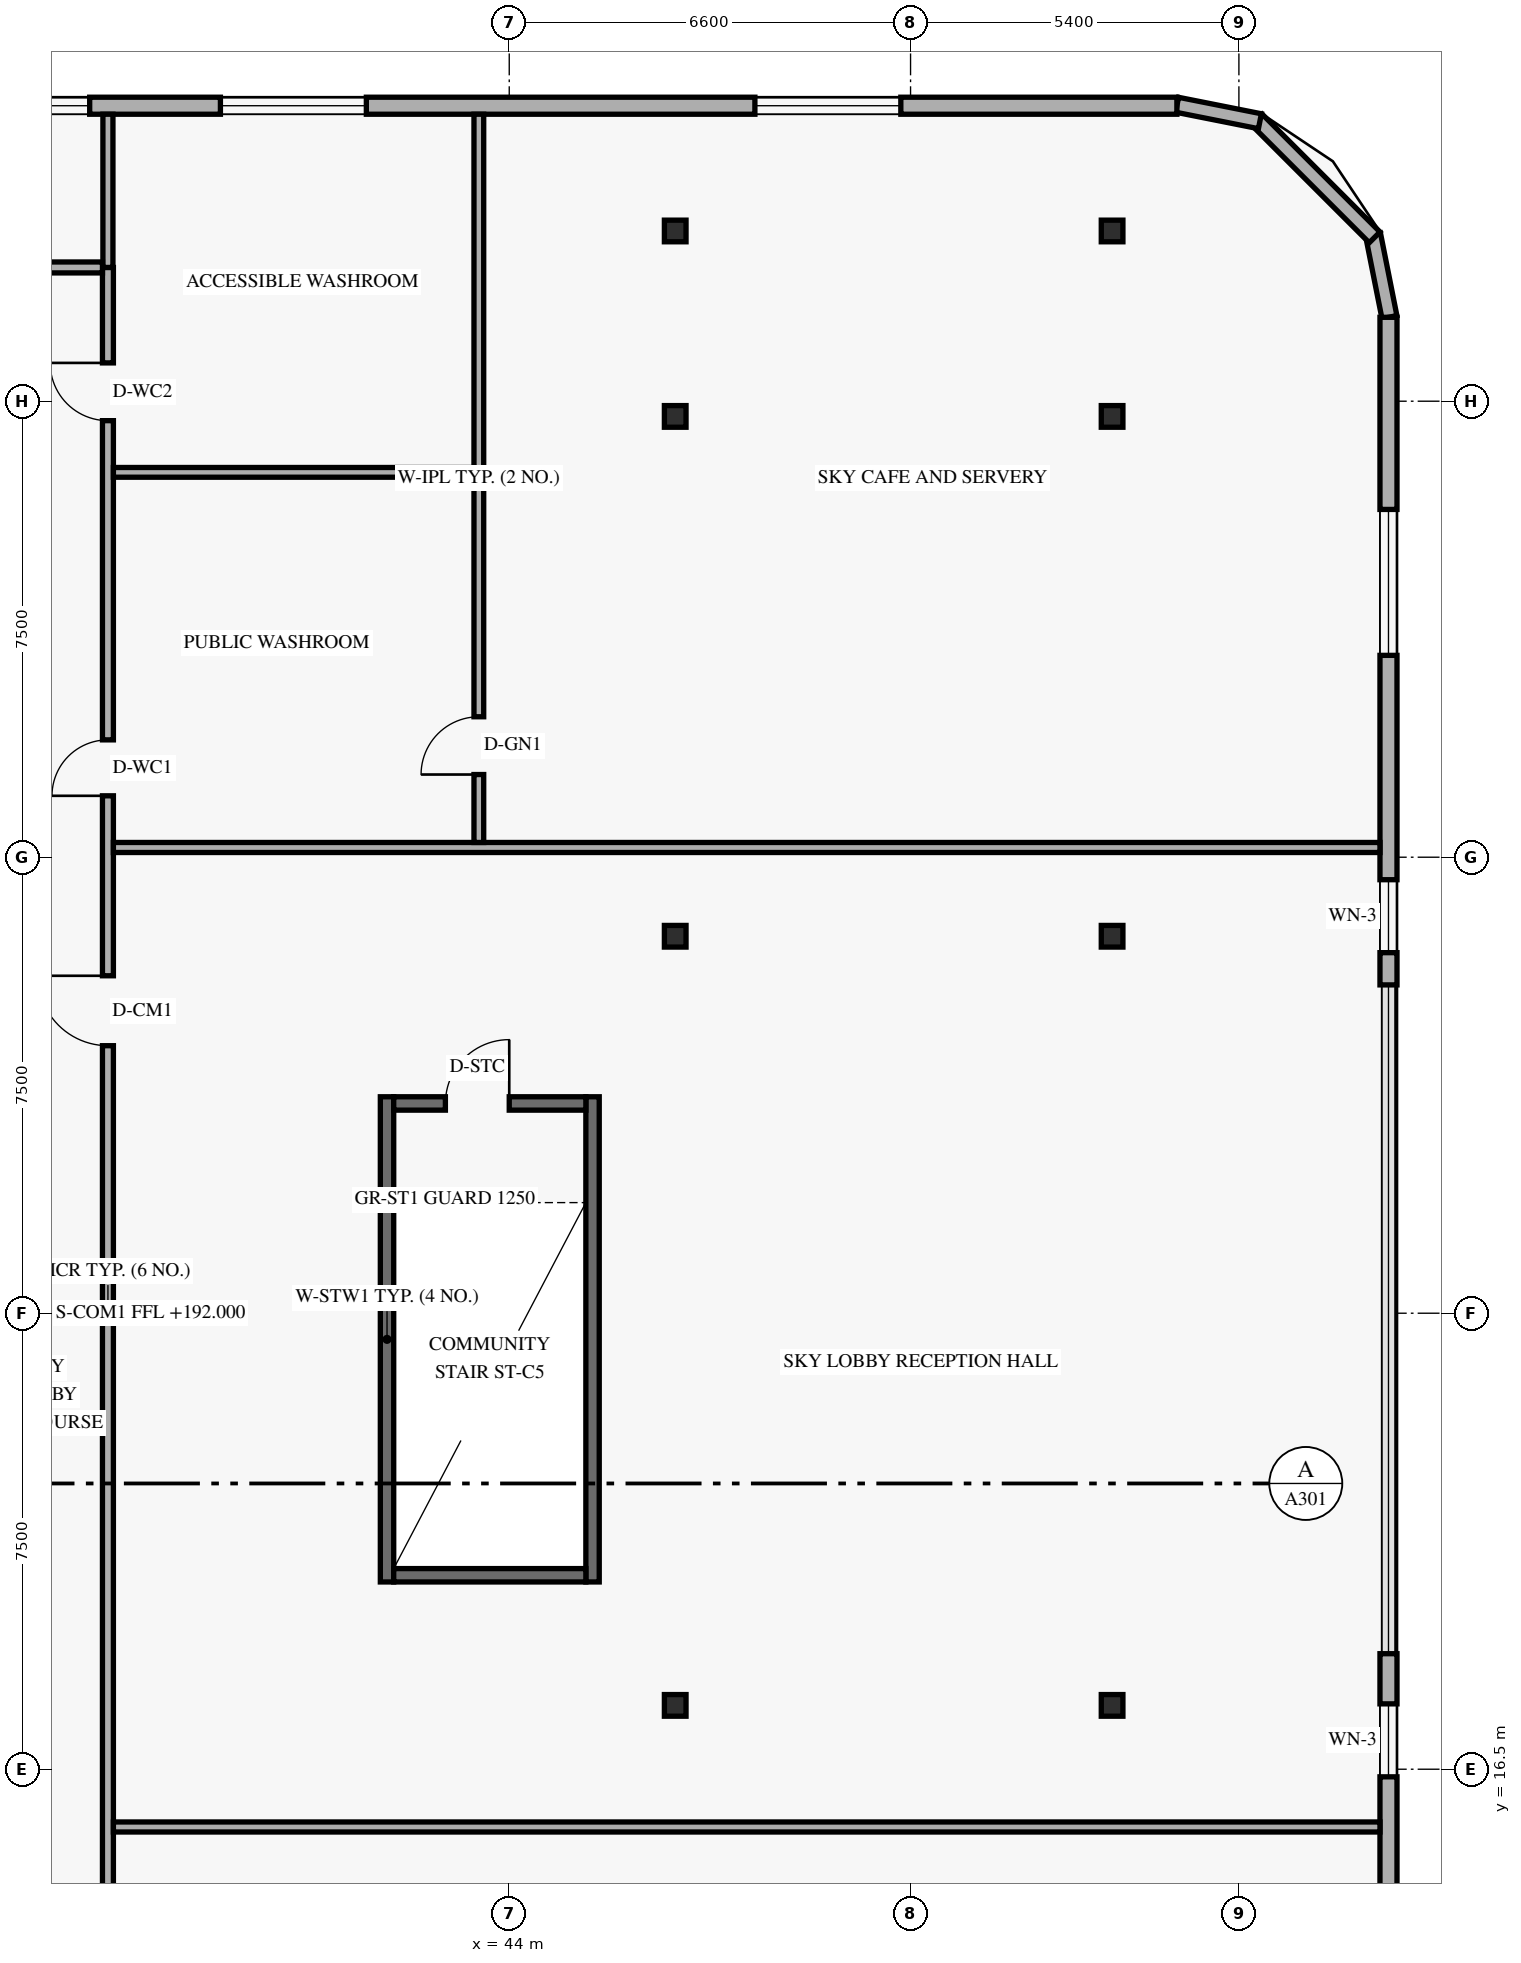
"""IFC4 building model, lengths in metres.
Left out: names, types, materials, properties, quantities, classifications, styles, units other than length and angle.
Written with IfcOpenShell. Run it as: python <this file> out.ifc"""

import sys

from ifc_helpers import new_model, si_unit, direction, frame, frame_2d, origin, origin_2d, place, context, subcontext, project, spatial, rectangle, hollow_rectangle, extrude, element, fill, save


model = new_model("IFC4")
c1 = context("Model", 3, precision=1e-05, world=origin(), true_north=direction((0.0, 1.0)))
c2 = subcontext(c1, "Body", "Model", "MODEL_VIEW")
j1 = project(units=[si_unit("LENGTHUNIT", "METRE"), si_unit("PLANEANGLEUNIT", "RADIAN")], contexts=[c1])
p1 = place(None, origin())
s1 = spatial("IfcSite", under=j1, at=p1, CompositionType="ELEMENT")
p2 = place(p1, origin())
s2 = spatial("IfcBuilding", under=s1, at=p2, CompositionType="ELEMENT")
p3 = place(p2, frame((0.0, 0.0, 192.0)))
s3 = spatial("IfcBuildingStorey", under=s2, at=p3, CompositionType="ELEMENT", Elevation=192.0)
for number, where, z_axis, x_axis in (
    (1, (41.99, 19.58, 0.0), (0.0, 0.0, 1.0), (0.0, 1.0, 0.0)),
    (2, (45.37, 19.58, 0.0), (0.0, 0.0, 1.0), (0.0, 1.0, 0.0)),
):
    element("IfcWall", number, at=place(p3, frame(where, z_axis=z_axis, x_axis=x_axis)), inside=s3, PredefinedType="SHEAR", context=c2, shape_type="SweptSolid", body=[
        extrude(rectangle(XDim=7.98, YDim=0.22, at=frame_2d((3.99, 0.0))), origin(), (0.0, 0.0, 1.0), 3.96),
    ])
p4 = place(p3, frame((42.1, 19.69, 0.0), z_axis=(0.0, 0.0, 1.0), x_axis=(1.0, 0.0, 0.0)))
e3 = element("IfcWall", 3, at=p4, inside=s3, PredefinedType="SHEAR", context=c2, shape_type="SweptSolid", body=[
    extrude(rectangle(XDim=3.16, YDim=0.22, at=frame_2d((1.58, 0.0))), origin(), (0.0, 0.0, 1.0), 3.96),
])
p5 = place(p3, frame((42.1, 27.45, 0.0), z_axis=(0.0, 0.0, 1.0), x_axis=(1.0, 0.0, 0.0)))
e4 = element("IfcWall", 4, at=p5, inside=s3, PredefinedType="SHEAR", context=c2, shape_type="SweptSolid", body=[
    extrude(rectangle(XDim=3.16, YDim=0.22, at=frame_2d((1.58, 0.0))), origin(), (0.0, 0.0, 1.0), 3.96),
])
p6 = place(p5, frame((0.85, 0.0, 0.0)))
e5 = element("IfcOpeningElement", 5, at=p6, cuts=e4, PredefinedType="OPENING", context=c2, shape_type="SweptSolid", body=[
    extrude(rectangle(XDim=1.05, YDim=2.15, at=frame_2d((0.525, 1.075))), frame((0.0, 0.12, 0.0), z_axis=(0.0, -1.0, 0.0), x_axis=(1.0, 0.0, 0.0)), (0.0, 0.0, 1.0), 0.24),
])
for number, where, z_axis, x_axis in (
    (6, (46.656, 17.55, 0.0), (0.035, 0.0, 0.999), (0.0, 1.0, 0.0)),
    (7, (46.656, 30.2, 0.0), (0.035, 0.0, 0.999), (0.0, 1.0, 0.0)),
    (8, (46.656, 38.75, 0.0), (0.035, 0.0, 0.999), (0.0, 1.0, 0.0)),
    (9, (46.656, 41.8, 0.0), (0.035, 0.0, 0.999), (0.0, 1.0, 0.0)),
):
    element("IfcColumn", number, at=place(p3, frame(where, z_axis=z_axis, x_axis=x_axis)), inside=s3, PredefinedType="COLUMN", context=c2, shape_type="SweptSolid", body=[
        extrude(hollow_rectangle(XDim=0.356, YDim=0.356, WallThickness=0.016, at=origin_2d()), origin(), (0.0, 0.0, 1.0), 4.203),
    ])
for number, where, z_axis, x_axis in (
    (10, (53.793, 17.55, 0.0), (0.058, 0.0, 0.998), (0.0, 1.0, 0.0)),
    (11, (53.793, 30.2, 0.0), (0.058, 0.0, 0.998), (0.0, 1.0, 0.0)),
    (12, (53.793, 38.75, 0.0), (0.058, 0.0, 0.998), (0.0, 1.0, 0.0)),
    (13, (53.793, 41.8, 0.0), (0.058, 0.0, 0.998), (0.0, 1.0, 0.0)),
):
    element("IfcColumn", number, at=place(p3, frame(where, z_axis=z_axis, x_axis=x_axis)), inside=s3, PredefinedType="COLUMN", context=c2, shape_type="SweptSolid", body=[
        extrude(hollow_rectangle(XDim=0.356, YDim=0.356, WallThickness=0.016, at=origin_2d()), origin(), (0.0, 0.0, 1.0), 4.207),
    ])
p7 = place(p3, frame((58.476, 40.384, 0.0), z_axis=(0.0, 0.0, 1.0), x_axis=(-0.19496651342, 0.980809899341, 0.0)))
e14 = element("IfcWall", 14, at=p7, inside=s3, PredefinedType="SOLIDWALL", context=c2, shape_type="SweptSolid", body=[
    extrude(rectangle(XDim=1.389, YDim=0.25, at=frame_2d((0.694, 0.0))), origin(), (0.0, 0.0, 1.0), 3.96),
])
p8 = place(p3, frame((58.232, 41.695, 0.0), z_axis=(0.0, 0.0, 1.0), x_axis=(-0.707106781187, 0.707106781187, 0.0)))
e15 = element("IfcWall", 15, at=p8, inside=s3, PredefinedType="SOLIDWALL", context=c2, shape_type="SweptSolid", body=[
    extrude(rectangle(XDim=2.739, YDim=0.25, at=frame_2d((1.37, 0.0))), origin(), (0.0, 0.0, 1.0), 3.96),
])
p9 = place(p3, frame((56.345, 43.605, 0.0), z_axis=(0.0, 0.0, 1.0), x_axis=(-0.980809899341, 0.19496651342, 0.0)))
e16 = element("IfcWall", 16, at=p9, inside=s3, PredefinedType="SOLIDWALL", context=c2, shape_type="SweptSolid", body=[
    extrude(rectangle(XDim=1.389, YDim=0.25, at=frame_2d((0.694, 0.0))), origin(), (0.0, 0.0, 1.0), 3.96),
])
p10 = place(p3, frame((58.46, 7.62, 0.0), z_axis=(0.0, 0.0, 1.0), x_axis=(0.0, 1.0, 0.0)))
e17 = element("IfcWall", 17, at=p10, inside=s3, PredefinedType="SOLIDWALL", context=c2, shape_type="SweptSolid", body=[
    extrude(rectangle(XDim=10.78, YDim=0.28, at=frame_2d((5.39, 0.0))), origin(), (0.0, 0.0, 1.0), 3.96),
])
p11 = place(p10, frame((2.765, 0.0, 0.85)))
e18 = element("IfcOpeningElement", 18, at=p11, cuts=e17, PredefinedType="OPENING", context=c2, shape_type="SweptSolid", body=[
    extrude(rectangle(XDim=2.4, YDim=1.9, at=frame_2d((1.2, 0.95))), frame((0.0, 0.15, 0.0), z_axis=(0.0, -1.0, 0.0), x_axis=(1.0, 0.0, 0.0)), (0.0, 0.0, 1.0), 0.3),
])
p12 = place(p10, frame((8.755, 0.0, 0.85)))
e19 = element("IfcOpeningElement", 19, at=p12, cuts=e17, PredefinedType="OPENING", context=c2, shape_type="SweptSolid", body=[
    extrude(rectangle(XDim=1.2, YDim=1.5, at=frame_2d((0.6, 0.75))), frame((0.0, 0.15, 0.0), z_axis=(0.0, -1.0, 0.0), x_axis=(1.0, 0.0, 0.0)), (0.0, 0.0, 1.0), 0.3),
])
p13 = place(p3, frame((58.46, 29.4, 0.0), z_axis=(0.0, 0.0, 1.0), x_axis=(0.0, 1.0, 0.0)))
e20 = element("IfcWall", 20, at=p13, inside=s3, PredefinedType="SOLIDWALL", context=c2, shape_type="SweptSolid", body=[
    extrude(rectangle(XDim=10.98, YDim=0.28, at=frame_2d((5.49, 0.0))), origin(), (0.0, 0.0, 1.0), 3.96),
])
p14 = place(p13, frame((0.53, 0.0, 0.85)))
e21 = element("IfcOpeningElement", 21, at=p14, cuts=e20, PredefinedType="OPENING", context=c2, shape_type="SweptSolid", body=[
    extrude(rectangle(XDim=1.2, YDim=1.5, at=frame_2d((0.6, 0.75))), frame((0.0, 0.15, 0.0), z_axis=(0.0, -1.0, 0.0), x_axis=(1.0, 0.0, 0.0)), (0.0, 0.0, 1.0), 0.3),
])
p15 = place(p13, frame((5.42, 0.0, 0.85)))
e22 = element("IfcOpeningElement", 22, at=p15, cuts=e20, PredefinedType="OPENING", context=c2, shape_type="SweptSolid", body=[
    extrude(rectangle(XDim=2.4, YDim=1.9, at=frame_2d((1.2, 0.95))), frame((0.0, 0.15, 0.0), z_axis=(0.0, -1.0, 0.0), x_axis=(1.0, 0.0, 0.0)), (0.0, 0.0, 1.0), 0.3),
])
p16 = place(p3, frame((54.98, 43.86, 0.0), z_axis=(0.0, 0.0, 1.0), x_axis=(-1.0, 0.0, 0.0)))
e23 = element("IfcWall", 23, at=p16, inside=s3, PredefinedType="SOLIDWALL", context=c2, shape_type="SweptSolid", body=[
    extrude(rectangle(XDim=20.58, YDim=0.28, at=frame_2d((10.29, 0.0))), origin(), (0.0, 0.0, 1.0), 3.96),
])
p17 = place(p16, frame((17.88, 0.0, 0.85)))
e24 = element("IfcOpeningElement", 24, at=p17, cuts=e23, PredefinedType="OPENING", context=c2, shape_type="SweptSolid", body=[
    extrude(rectangle(XDim=2.4, YDim=1.9, at=frame_2d((1.2, 0.95))), frame((0.0, 0.15, 0.0), z_axis=(0.0, -1.0, 0.0), x_axis=(1.0, 0.0, 0.0)), (0.0, 0.0, 1.0), 0.3),
])
p18 = place(p16, frame((13.33, 0.0, 0.85)))
e25 = element("IfcOpeningElement", 25, at=p18, cuts=e23, PredefinedType="OPENING", context=c2, shape_type="SweptSolid", body=[
    extrude(rectangle(XDim=2.4, YDim=1.9, at=frame_2d((1.2, 0.95))), frame((0.0, 0.15, 0.0), z_axis=(0.0, -1.0, 0.0), x_axis=(1.0, 0.0, 0.0)), (0.0, 0.0, 1.0), 0.3),
])
p19 = place(p16, frame((4.54, 0.0, 0.85)))
e26 = element("IfcOpeningElement", 26, at=p19, cuts=e23, PredefinedType="OPENING", context=c2, shape_type="SweptSolid", body=[
    extrude(rectangle(XDim=2.4, YDim=1.9, at=frame_2d((1.2, 0.95))), frame((0.0, 0.15, 0.0), z_axis=(0.0, -1.0, 0.0), x_axis=(1.0, 0.0, 0.0)), (0.0, 0.0, 1.0), 0.3),
])
p20 = place(p3, frame((37.4, 6.8, 0.0), z_axis=(0.0, 0.0, 1.0), x_axis=(0.0, 1.0, 0.0)))
e27 = element("IfcWall", 27, at=p20, inside=s3, PredefinedType="STANDARD", context=c2, shape_type="SweptSolid", body=[
    extrude(rectangle(XDim=34.4, YDim=0.18, at=frame_2d((17.2, 0.0))), origin(), (0.0, 0.0, 1.0), 3.33),
])
p21 = place(p20, frame((25.71, 0.0, 0.0)))
e28 = element("IfcOpeningElement", 28, at=p21, cuts=e27, PredefinedType="OPENING", context=c2, shape_type="SweptSolid", body=[
    extrude(rectangle(XDim=0.92, YDim=2.14, at=frame_2d((0.46, 1.07))), frame((0.0, 0.1, 0.0), z_axis=(0.0, -1.0, 0.0), x_axis=(1.0, 0.0, 0.0)), (0.0, 0.0, 1.0), 0.2),
])
p22 = place(p20, frame((31.88, 0.0, 0.0)))
e29 = element("IfcOpeningElement", 29, at=p22, cuts=e27, PredefinedType="OPENING", context=c2, shape_type="SweptSolid", body=[
    extrude(rectangle(XDim=0.95, YDim=2.14, at=frame_2d((0.475, 1.07))), frame((0.0, 0.1, 0.0), z_axis=(0.0, -1.0, 0.0), x_axis=(1.0, 0.0, 0.0)), (0.0, 0.0, 1.0), 0.2),
])
p23 = place(p20, frame((2.8, 0.0, 0.0)))
e30 = element("IfcOpeningElement", 30, at=p23, cuts=e27, PredefinedType="OPENING", context=c2, shape_type="SweptSolid", body=[
    extrude(rectangle(XDim=1.15, YDim=2.15, at=frame_2d((0.575, 1.075))), frame((0.0, 0.1, 0.0), z_axis=(0.0, -1.0, 0.0), x_axis=(1.0, 0.0, 0.0)), (0.0, 0.0, 1.0), 0.2),
])
p24 = place(p20, frame((21.6, 0.0, 0.0)))
e31 = element("IfcOpeningElement", 31, at=p24, cuts=e27, PredefinedType="OPENING", context=c2, shape_type="SweptSolid", body=[
    extrude(rectangle(XDim=1.15, YDim=2.15, at=frame_2d((0.575, 1.075))), frame((0.0, 0.1, 0.0), z_axis=(0.0, -1.0, 0.0), x_axis=(1.0, 0.0, 0.0)), (0.0, 0.0, 1.0), 0.2),
])
p25 = place(p3, frame((37.4, 41.2, 0.0), z_axis=(0.0, 0.0, 1.0), x_axis=(0.0, 1.0, 0.0)))
e32 = element("IfcWall", 32, at=p25, inside=s3, PredefinedType="PARTITIONING", context=c2, shape_type="SweptSolid", body=[
    extrude(rectangle(XDim=2.52, YDim=0.165, at=frame_2d((1.26, 0.0))), origin(), (0.0, 0.0, 1.0), 3.479),
])
for number, where, z_axis, x_axis in (
    (33, (37.49, 15.55, 0.0), (0.0, 0.0, 1.0), (1.0, 0.0, 0.0)),
    (34, (37.49, 31.66, 0.0), (0.0, 0.0, 1.0), (1.0, 0.0, 0.0)),
):
    element("IfcWall", number, at=place(p3, frame(where, z_axis=z_axis, x_axis=x_axis)), inside=s3, PredefinedType="PARTITIONING", context=c2, shape_type="SweptSolid", body=[
        extrude(rectangle(XDim=20.83, YDim=0.165, at=frame_2d((10.415, 0.0))), origin(), (0.0, 0.0, 1.0), 3.33),
    ])
p26 = place(p3, frame((43.5, 31.742, 0.0), z_axis=(0.0, 0.0, 1.0), x_axis=(0.0, 1.0, 0.0)))
e35 = element("IfcWall", 35, at=p26, inside=s3, PredefinedType="PLUMBINGWALL", context=c2, shape_type="SweptSolid", body=[
    extrude(rectangle(XDim=11.978, YDim=0.16, at=frame_2d((5.989, 0.0))), origin(), (0.0, 0.0, 1.0), 3.33),
])
p27 = place(p26, frame((1.117, 0.0, 0.0)))
e36 = element("IfcOpeningElement", 36, at=p27, cuts=e35, PredefinedType="OPENING", context=c2, shape_type="SweptSolid", body=[
    extrude(rectangle(XDim=0.95, YDim=2.15, at=frame_2d((0.475, 1.075))), frame((0.0, 0.09, 0.0), z_axis=(0.0, -1.0, 0.0), x_axis=(1.0, 0.0, 0.0)), (0.0, 0.0, 1.0), 0.18),
])
p28 = place(p3, frame((37.49, 37.83, 0.0), z_axis=(0.0, 0.0, 1.0), x_axis=(1.0, 0.0, 0.0)))
e37 = element("IfcWall", 37, at=p28, inside=s3, PredefinedType="PLUMBINGWALL", context=c2, shape_type="SweptSolid", body=[
    extrude(rectangle(XDim=5.93, YDim=0.16, at=frame_2d((2.965, 0.0))), origin(), (0.0, 0.0, 1.0), 3.96),
])
p29 = place(p3, frame((21.74, 41.2, 0.0), z_axis=(0.0, 0.0, 1.0), x_axis=(1.0, 0.0, 0.0)))
e38 = element("IfcWall", 38, at=p29, inside=s3, PredefinedType="STANDARD", context=c2, shape_type="SweptSolid", body=[
    extrude(rectangle(XDim=15.57, YDim=0.18, at=frame_2d((7.785, 0.0))), origin(), (0.0, 0.0, 1.0), 3.33),
])
p30 = place(p29, frame((5.41, 0.0, 0.0)))
e39 = element("IfcOpeningElement", 39, at=p30, cuts=e38, PredefinedType="OPENING", context=c2, shape_type="SweptSolid", body=[
    extrude(rectangle(XDim=0.95, YDim=2.15, at=frame_2d((0.475, 1.075))), frame((0.0, 0.1, 0.0), z_axis=(0.0, -1.0, 0.0), x_axis=(1.0, 0.0, 0.0)), (0.0, 0.0, 1.0), 0.2),
])
p31 = place(p12, origin())
e40 = element("IfcWindow", 40, at=p31, inside=s3, PartitioningType="SINGLE_PANEL", PredefinedType="WINDOW", context=c2, shape_type="SweptSolid", body=[
    extrude(rectangle(XDim=1.2, YDim=1.5, at=frame_2d((0.6, 0.75))), frame((0.0, 0.03, 0.0), z_axis=(0.0, -1.0, 0.0), x_axis=(1.0, 0.0, 0.0)), (0.0, 0.0, 1.0), 0.06),
])
fill(e19, e40)
p32 = place(p14, origin())
e41 = element("IfcWindow", 41, at=p32, inside=s3, PartitioningType="SINGLE_PANEL", PredefinedType="WINDOW", context=c2, shape_type="SweptSolid", body=[
    extrude(rectangle(XDim=1.2, YDim=1.5, at=frame_2d((0.6, 0.75))), frame((0.0, 0.03, 0.0), z_axis=(0.0, -1.0, 0.0), x_axis=(1.0, 0.0, 0.0)), (0.0, 0.0, 1.0), 0.06),
])
fill(e21, e41)
p33 = place(p15, origin())
e42 = element("IfcWindow", 42, at=p33, inside=s3, PartitioningType="SINGLE_PANEL", PredefinedType="WINDOW", context=c2, shape_type="SweptSolid", body=[
    extrude(rectangle(XDim=2.4, YDim=1.9, at=frame_2d((1.2, 0.95))), frame((0.0, 0.03, 0.0), z_axis=(0.0, -1.0, 0.0), x_axis=(1.0, 0.0, 0.0)), (0.0, 0.0, 1.0), 0.06),
])
fill(e22, e42)
p34 = place(p17, origin())
e43 = element("IfcWindow", 43, at=p34, inside=s3, PartitioningType="SINGLE_PANEL", PredefinedType="WINDOW", context=c2, shape_type="SweptSolid", body=[
    extrude(rectangle(XDim=2.4, YDim=1.9, at=frame_2d((1.2, 0.95))), frame((0.0, 0.03, 0.0), z_axis=(0.0, -1.0, 0.0), x_axis=(1.0, 0.0, 0.0)), (0.0, 0.0, 1.0), 0.06),
])
fill(e24, e43)
p35 = place(p18, origin())
e44 = element("IfcWindow", 44, at=p35, inside=s3, PartitioningType="SINGLE_PANEL", PredefinedType="WINDOW", context=c2, shape_type="SweptSolid", body=[
    extrude(rectangle(XDim=2.4, YDim=1.9, at=frame_2d((1.2, 0.95))), frame((0.0, 0.03, 0.0), z_axis=(0.0, -1.0, 0.0), x_axis=(1.0, 0.0, 0.0)), (0.0, 0.0, 1.0), 0.06),
])
fill(e25, e44)
p36 = place(p19, origin())
e45 = element("IfcWindow", 45, at=p36, inside=s3, PartitioningType="SINGLE_PANEL", PredefinedType="WINDOW", context=c2, shape_type="SweptSolid", body=[
    extrude(rectangle(XDim=2.4, YDim=1.9, at=frame_2d((1.2, 0.95))), frame((0.0, 0.03, 0.0), z_axis=(0.0, -1.0, 0.0), x_axis=(1.0, 0.0, 0.0)), (0.0, 0.0, 1.0), 0.06),
])
fill(e26, e45)
p37 = place(p6, frame((1.05, 0.0, 0.0), z_axis=(0.0, 0.0, 1.0), x_axis=(-1.0, 0.0, 0.0)))
e46 = element("IfcDoor", 46, at=p37, inside=s3, OperationType="SINGLE_SWING_LEFT", PredefinedType="DOOR", context=c2, shape_type="SweptSolid", body=[
    extrude(rectangle(XDim=1.05, YDim=2.15, at=frame_2d((0.525, 1.075))), frame((0.0, 0.025, 0.0), z_axis=(0.0, -1.0, 0.0), x_axis=(1.0, 0.0, 0.0)), (0.0, 0.0, 1.0), 0.05),
])
fill(e5, e46)
p38 = place(p21, origin())
e47 = element("IfcDoor", 47, at=p38, inside=s3, OperationType="SINGLE_SWING_LEFT", PredefinedType="DOOR", context=c2, shape_type="SweptSolid", body=[
    extrude(rectangle(XDim=0.92, YDim=2.14, at=frame_2d((0.46, 1.07))), frame((0.0, 0.025, 0.0), z_axis=(0.0, -1.0, 0.0), x_axis=(1.0, 0.0, 0.0)), (0.0, 0.0, 1.0), 0.05),
])
fill(e28, e47)
p39 = place(p22, origin())
e48 = element("IfcDoor", 48, at=p39, inside=s3, OperationType="SINGLE_SWING_RIGHT", PredefinedType="DOOR", context=c2, shape_type="SweptSolid", body=[
    extrude(rectangle(XDim=0.95, YDim=2.14, at=frame_2d((0.475, 1.07))), frame((0.0, 0.025, 0.0), z_axis=(0.0, -1.0, 0.0), x_axis=(1.0, 0.0, 0.0)), (0.0, 0.0, 1.0), 0.05),
])
fill(e29, e48)
p40 = place(p27, origin())
e49 = element("IfcDoor", 49, at=p40, inside=s3, OperationType="SINGLE_SWING_LEFT", PredefinedType="DOOR", context=c2, shape_type="SweptSolid", body=[
    extrude(rectangle(XDim=0.95, YDim=2.15, at=frame_2d((0.475, 1.075))), frame((0.0, 0.025, 0.0), z_axis=(0.0, -1.0, 0.0), x_axis=(1.0, 0.0, 0.0)), (0.0, 0.0, 1.0), 0.05),
])
fill(e36, e49)
p41 = place(p24, origin())
e50 = element("IfcDoor", 50, at=p41, inside=s3, OperationType="SINGLE_SWING_RIGHT", PredefinedType="DOOR", context=c2, shape_type="SweptSolid", body=[
    extrude(rectangle(XDim=1.15, YDim=2.15, at=frame_2d((0.575, 1.075))), frame((0.0, 0.025, 0.0), z_axis=(0.0, -1.0, 0.0), x_axis=(1.0, 0.0, 0.0)), (0.0, 0.0, 1.0), 0.05),
])
fill(e31, e50)
save(model, sys.argv[1])
